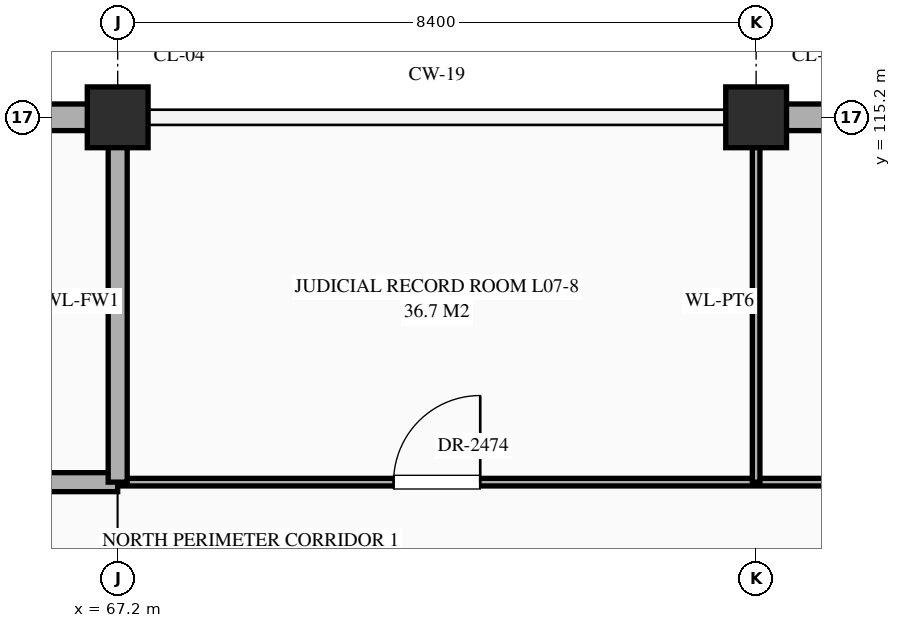
"""IFC4 building model, lengths in metres.
Left out: names, types, materials, properties, quantities, classifications, styles, units other than length and angle.
Written with IfcOpenShell. Run it as: python <this file> out.ifc"""

import sys

from ifc_helpers import new_model, si_unit, direction, frame, frame_2d, origin, origin_2d, place, context, subcontext, project, spatial, rectangle, extrude, element, fill, save


model = new_model("IFC4")
c1 = context("Model", 3, precision=1e-05, world=origin(), true_north=direction((0.0, 1.0)))
c2 = subcontext(c1, "Body", "Model", "MODEL_VIEW")
j1 = project(units=[si_unit("LENGTHUNIT", "METRE"), si_unit("PLANEANGLEUNIT", "RADIAN")], contexts=[c1])
p1 = place(None, origin())
s1 = spatial("IfcSite", under=j1, at=p1, CompositionType="ELEMENT")
p2 = place(p1, origin())
s2 = spatial("IfcBuilding", under=s1, at=p2, CompositionType="ELEMENT")
p3 = place(p2, frame((0.0, 0.0, 30.6)))
s3 = spatial("IfcBuildingStorey", under=s2, at=p3, CompositionType="ELEMENT", Elevation=30.6)
for number, where, z_axis, x_axis in (
    (1, (67.2, 115.2, 0.0), (0.0, 0.0, 1.0), (1.0, 0.0, 0.0)),
    (2, (75.6, 115.2, 0.0), (0.0, 0.0, 1.0), (1.0, 0.0, 0.0)),
):
    element("IfcColumn", number, at=place(p3, frame(where, z_axis=z_axis, x_axis=x_axis)), inside=s3, PredefinedType="COLUMN", context=c2, shape_type="SweptSolid", body=[
        extrude(rectangle(XDim=0.8, YDim=0.8, at=origin_2d()), origin(), (0.0, 0.0, 1.0), 4.5),
    ])
p4 = place(p3, frame((59.195, 115.2, 0.0), z_axis=(0.0, 0.0, 1.0), x_axis=(1.0, 0.0, 0.0)))
e3 = element("IfcWall", 3, at=p4, inside=s3, PredefinedType="STANDARD", context=c2, shape_type="SweptSolid", body=[
    extrude(rectangle(XDim=7.61, YDim=0.35, at=frame_2d((3.805, 0.0))), origin(), (0.0, 0.0, 1.0), 3.59),
])
p5 = place(p3, frame((75.995, 115.2, 0.0), z_axis=(0.0, 0.0, 1.0), x_axis=(1.0, 0.0, 0.0)))
e4 = element("IfcWall", 4, at=p5, inside=s3, PredefinedType="STANDARD", context=c2, shape_type="SweptSolid", body=[
    extrude(rectangle(XDim=7.61, YDim=0.35, at=frame_2d((3.805, 0.0))), origin(), (0.0, 0.0, 1.0), 3.59),
])
p6 = place(p5, frame((3.205, 0.0, 0.85)))
e5 = element("IfcOpeningElement", 5, at=p6, cuts=e4, PredefinedType="OPENING", context=c2, shape_type="SweptSolid", body=[
    extrude(rectangle(XDim=1.2, YDim=1.74, at=frame_2d((0.6, 0.87))), frame((0.0, 0.187, 0.0), z_axis=(0.0, -1.0, 0.0), x_axis=(1.0, 0.0, 0.0)), (0.0, 0.0, 1.0), 0.374),
])
p7 = place(p3, frame((58.8, 110.4, 0.0), z_axis=(0.0, 0.0, 1.0), x_axis=(1.0, 0.0, 0.0)))
e6 = element("IfcWall", 6, at=p7, inside=s3, PredefinedType="STANDARD", context=c2, shape_type="SweptSolid", body=[
    extrude(rectangle(XDim=8.4, YDim=0.25, at=frame_2d((4.2, 0.0))), origin(), (0.0, 0.0, 1.0), 4.24),
])
p8 = place(p7, frame((3.725, 0.0, 0.0)))
e7 = element("IfcOpeningElement", 7, at=p8, cuts=e6, PredefinedType="OPENING", context=c2, shape_type="SweptSolid", body=[
    extrude(rectangle(XDim=0.95, YDim=2.15, at=frame_2d((0.475, 1.075))), frame((0.0, 0.137, 0.0), z_axis=(0.0, -1.0, 0.0), x_axis=(1.0, 0.0, 0.0)), (0.0, 0.0, 1.0), 0.274),
])
p9 = place(p3, frame((67.2, 110.4, 0.0), z_axis=(0.0, 0.0, 1.0), x_axis=(1.0, 0.0, 0.0)))
e8 = element("IfcWall", 8, at=p9, inside=s3, PredefinedType="STANDARD", context=c2, shape_type="SweptSolid", body=[
    extrude(rectangle(XDim=33.6, YDim=0.1, at=frame_2d((16.8, 0.0))), origin(), (0.0, 0.0, 1.0), 4.24),
])
p10 = place(p9, frame((3.63, 0.0, 0.0)))
e9 = element("IfcOpeningElement", 9, at=p10, cuts=e8, PredefinedType="OPENING", context=c2, shape_type="SweptSolid", body=[
    extrude(rectangle(XDim=1.14, YDim=2.4, at=frame_2d((0.57, 1.2))), frame((0.0, 0.062, 0.0), z_axis=(0.0, -1.0, 0.0), x_axis=(1.0, 0.0, 0.0)), (0.0, 0.0, 1.0), 0.124),
])
p11 = place(p9, frame((12.15, 0.0, 0.0)))
e10 = element("IfcOpeningElement", 10, at=p11, cuts=e8, PredefinedType="OPENING", context=c2, shape_type="SweptSolid", body=[
    extrude(rectangle(XDim=0.9, YDim=2.15, at=frame_2d((0.45, 1.075))), frame((0.0, 0.062, 0.0), z_axis=(0.0, -1.0, 0.0), x_axis=(1.0, 0.0, 0.0)), (0.0, 0.0, 1.0), 0.124),
])
p12 = place(p9, frame((20.57, 0.0, 0.0)))
e11 = element("IfcOpeningElement", 11, at=p12, cuts=e8, PredefinedType="OPENING", context=c2, shape_type="SweptSolid", body=[
    extrude(rectangle(XDim=0.86, YDim=2.1, at=frame_2d((0.43, 1.05))), frame((0.0, 0.062, 0.0), z_axis=(0.0, -1.0, 0.0), x_axis=(1.0, 0.0, 0.0)), (0.0, 0.0, 1.0), 0.124),
])
p13 = place(p9, frame((28.94, 0.0, 0.0)))
e12 = element("IfcOpeningElement", 12, at=p13, cuts=e8, PredefinedType="OPENING", context=c2, shape_type="SweptSolid", body=[
    extrude(rectangle(XDim=0.92, YDim=2.15, at=frame_2d((0.46, 1.075))), frame((0.0, 0.062, 0.0), z_axis=(0.0, -1.0, 0.0), x_axis=(1.0, 0.0, 0.0)), (0.0, 0.0, 1.0), 0.124),
])
p14 = place(p3, frame((67.2, 110.4, 0.0), z_axis=(0.0, 0.0, 1.0), x_axis=(0.0, 1.0, 0.0)))
e13 = element("IfcWall", 13, at=p14, inside=s3, PredefinedType="STANDARD", context=c2, shape_type="SweptSolid", body=[
    extrude(rectangle(XDim=4.76, YDim=0.25, at=frame_2d((2.38, 0.0))), origin(), (0.0, 0.0, 1.0), 3.49),
])
p15 = place(p3, frame((75.6, 110.4, 0.0), z_axis=(0.0, 0.0, 1.0), x_axis=(0.0, 1.0, 0.0)))
e14 = element("IfcWall", 14, at=p15, inside=s3, PredefinedType="STANDARD", context=c2, shape_type="SweptSolid", body=[
    extrude(rectangle(XDim=4.76, YDim=0.1, at=frame_2d((2.38, 0.0))), origin(), (0.0, 0.0, 1.0), 3.49),
])
p16 = place(p10, origin())
e15 = element("IfcDoor", 15, at=p16, inside=s3, OperationType="SINGLE_SWING_RIGHT", PredefinedType="DOOR", context=c2, shape_type="SweptSolid", body=[
    extrude(rectangle(XDim=1.14, YDim=2.4, at=frame_2d((0.57, 1.2))), frame((0.0, 0.025, 0.0), z_axis=(0.0, -1.0, 0.0), x_axis=(1.0, 0.0, 0.0)), (0.0, 0.0, 1.0), 0.05),
])
fill(e9, e15)
save(model, sys.argv[1])
